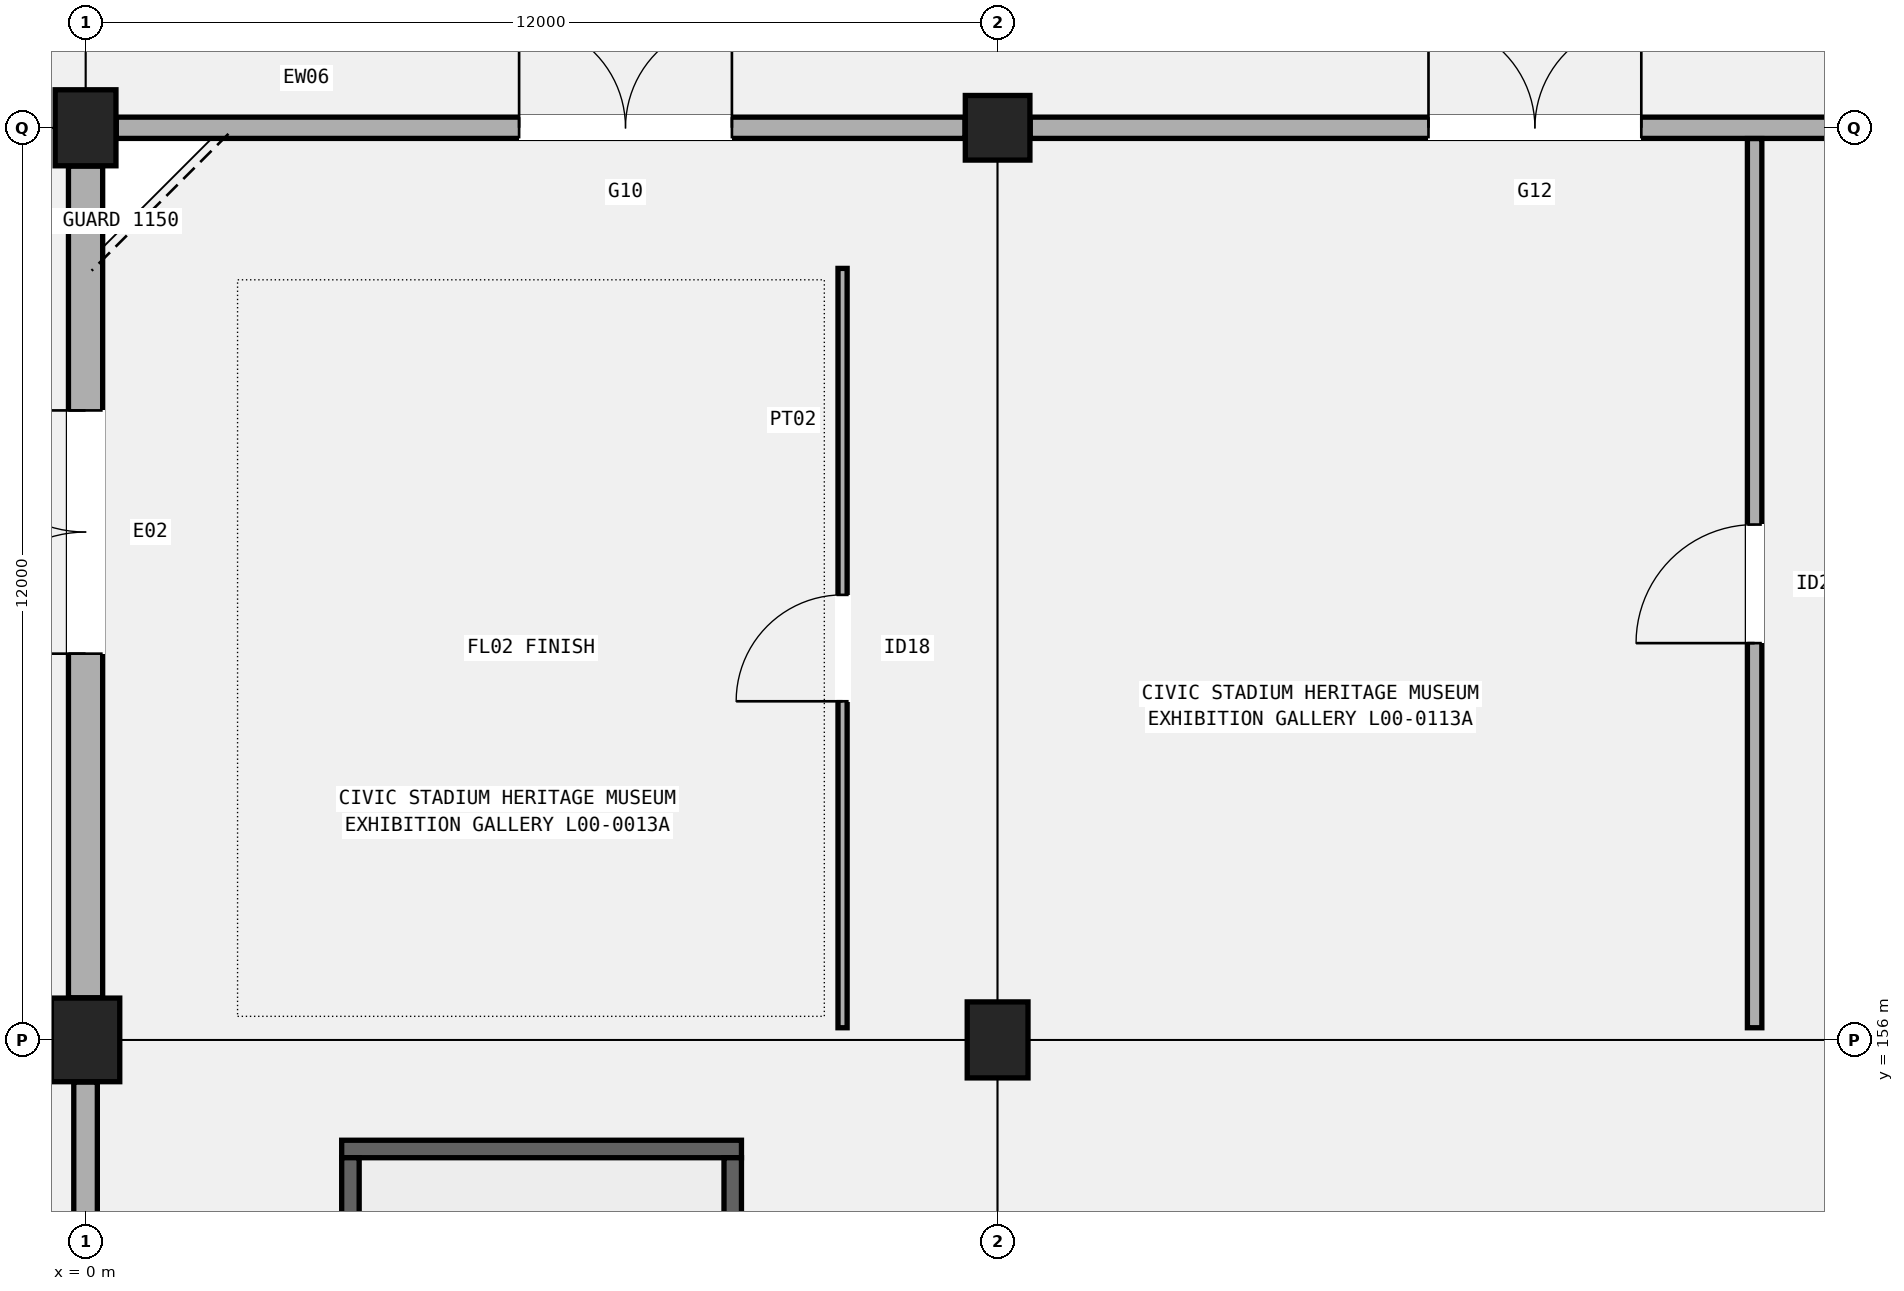
"""IFC4 building model, lengths in metres.
Left out: names, types, materials, properties, quantities, classifications, styles, units other than length and angle.
Written with IfcOpenShell. Run it as: python <this file> out.ifc"""

import sys

from ifc_helpers import new_model, si_unit, direction, frame, frame_2d, origin, origin_2d, place, context, subcontext, project, spatial, rectangle, circle, extrude, element, fill, save


model = new_model("IFC4")
c1 = context("Model", 3, precision=1e-05, world=origin(), true_north=direction((0.0, 1.0)))
c2 = subcontext(c1, "Body", "Model", "MODEL_VIEW")
j1 = project(units=[si_unit("LENGTHUNIT", "METRE"), si_unit("PLANEANGLEUNIT", "RADIAN")], contexts=[c1])
p1 = place(None, origin())
s1 = spatial("IfcSite", under=j1, at=p1, CompositionType="ELEMENT")
p2 = place(p1, origin())
s2 = spatial("IfcBuilding", under=s1, at=p2, CompositionType="ELEMENT")
p3 = place(p2, origin())
s3 = spatial("IfcBuildingStorey", under=s2, at=p3, CompositionType="ELEMENT", Elevation=0.0)
p4 = place(p3, frame((0.0, 156.0, 0.0), z_axis=(0.0, 0.0, 1.0), x_axis=(1.0, 0.0, 0.0)))
e1 = element("IfcColumn", 1, at=p4, inside=s3, PredefinedType="COLUMN", context=c2, shape_type="SweptSolid", body=[
    extrude(rectangle(XDim=0.9, YDim=1.1, at=origin_2d()), origin(), (0.0, 0.0, 1.0), 5.4),
])
for number, where, z_axis, x_axis in (
    (2, (0.0, 168.0, 0.0), (0.0, 0.0, 1.0), (1.0, 0.0, 0.0)),
    (3, (12.0, 156.0, 0.0), (0.0, 0.0, 1.0), (1.0, 0.0, 0.0)),
):
    element("IfcColumn", number, at=place(p3, frame(where, z_axis=z_axis, x_axis=x_axis)), inside=s3, PredefinedType="COLUMN", context=c2, shape_type="SweptSolid", body=[
        extrude(rectangle(XDim=0.8, YDim=1.0, at=origin_2d()), origin(), (0.0, 0.0, 1.0), 5.4),
    ])
p5 = place(p3, frame((12.0, 168.0, 0.0), z_axis=(0.0, 0.0, 1.0), x_axis=(1.0, 0.0, 0.0)))
e4 = element("IfcColumn", 4, at=p5, inside=s3, PredefinedType="COLUMN", context=c2, shape_type="SweptSolid", body=[
    extrude(circle(Radius=0.425, at=origin_2d()), origin(), (0.0, 0.0, 1.0), 5.4),
])
p6 = place(p3, frame((0.0, 144.604, 0.0), z_axis=(0.0, 0.0, 1.0), x_axis=(0.0, 1.0, 0.0)))
e5 = element("IfcWall", 5, at=p6, inside=s3, PredefinedType="SOLIDWALL", context=c2, shape_type="SweptSolid", body=[
    extrude(rectangle(XDim=10.842, YDim=0.31, at=frame_2d((5.421, 0.0))), origin(), (0.0, 0.0, 1.0), 4.24),
])
p7 = place(p6, frame((5.105, 0.0, 0.0)))
e6 = element("IfcOpeningElement", 6, at=p7, cuts=e5, PredefinedType="OPENING", context=c2, shape_type="SweptSolid", body=[
    extrude(rectangle(XDim=2.8, YDim=2.4, at=frame_2d((1.4, 1.2))), frame((0.0, 0.165, 0.0), z_axis=(0.0, -1.0, 0.0), x_axis=(1.0, 0.0, 0.0)), (0.0, 0.0, 1.0), 0.33),
])
p8 = place(p3, frame((0.404, 168.0, 0.0), z_axis=(0.0, 0.0, 1.0), x_axis=(1.0, 0.0, 0.0)))
e7 = element("IfcWall", 7, at=p8, inside=s3, PredefinedType="SOLIDWALL", context=c2, shape_type="SweptSolid", body=[
    extrude(rectangle(XDim=11.167, YDim=0.28, at=frame_2d((5.583, 0.0))), origin(), (0.0, 0.0, 1.0), 4.24),
])
p9 = place(p8, frame((5.3, 0.0, 0.0)))
e8 = element("IfcOpeningElement", 8, at=p9, cuts=e7, PredefinedType="OPENING", context=c2, shape_type="SweptSolid", body=[
    extrude(rectangle(XDim=2.8, YDim=2.4, at=frame_2d((1.4, 1.2))), frame((0.0, 0.15, 0.0), z_axis=(0.0, -1.0, 0.0), x_axis=(1.0, 0.0, 0.0)), (0.0, 0.0, 1.0), 0.3),
])
p10 = place(p3, frame((0.0, 156.554, 0.0), z_axis=(0.0, 0.0, 1.0), x_axis=(0.0, 1.0, 0.0)))
e9 = element("IfcWall", 9, at=p10, inside=s3, PredefinedType="SOLIDWALL", context=c2, shape_type="SweptSolid", body=[
    extrude(rectangle(XDim=10.942, YDim=0.45, at=frame_2d((5.471, 0.0))), origin(), (0.0, 0.0, 1.0), 4.34),
])
p11 = place(p10, frame((4.528, 0.0, 0.0)))
e10 = element("IfcOpeningElement", 10, at=p11, cuts=e9, PredefinedType="OPENING", context=c2, shape_type="SweptSolid", body=[
    extrude(rectangle(XDim=3.2, YDim=2.6, at=frame_2d((1.6, 1.3))), frame((0.0, 0.235, 0.0), z_axis=(0.0, -1.0, 0.0), x_axis=(1.0, 0.0, 0.0)), (0.0, 0.0, 1.0), 0.47),
])
p12 = place(p3, frame((12.429, 168.0, 0.0), z_axis=(0.0, 0.0, 1.0), x_axis=(1.0, 0.0, 0.0)))
e11 = element("IfcWall", 11, at=p12, inside=s3, PredefinedType="SOLIDWALL", context=c2, shape_type="SweptSolid", body=[
    extrude(rectangle(XDim=11.067, YDim=0.28, at=frame_2d((5.534, 0.0))), origin(), (0.0, 0.0, 1.0), 4.34),
])
p13 = place(p12, frame((5.24, 0.0, 0.0)))
e12 = element("IfcOpeningElement", 12, at=p13, cuts=e11, PredefinedType="OPENING", context=c2, shape_type="SweptSolid", body=[
    extrude(rectangle(XDim=2.8, YDim=2.4, at=frame_2d((1.4, 1.2))), frame((0.0, 0.15, 0.0), z_axis=(0.0, -1.0, 0.0), x_axis=(1.0, 0.0, 0.0)), (0.0, 0.0, 1.0), 0.3),
])
p14 = place(p3, frame((3.37, 154.565, 0.0), z_axis=(0.0, 0.0, 1.0), x_axis=(1.0, 0.0, 0.0)))
e13 = element("IfcWall", 13, at=p14, inside=s3, PredefinedType="SHEAR", context=c2, shape_type="SweptSolid", body=[
    extrude(rectangle(XDim=5.26, YDim=0.23, at=frame_2d((2.63, 0.0))), origin(), (0.0, 0.0, 1.0), 5.14),
])
for number, where, z_axis, x_axis in (
    (14, (3.485, 145.55, 0.0), (0.0, 0.0, 1.0), (0.0, 1.0, 0.0)),
    (15, (8.515, 145.55, 0.0), (0.0, 0.0, 1.0), (0.0, 1.0, 0.0)),
):
    element("IfcWall", number, at=place(p3, frame(where, z_axis=z_axis, x_axis=x_axis)), inside=s3, PredefinedType="SHEAR", context=c2, shape_type="SweptSolid", body=[
        extrude(rectangle(XDim=8.9, YDim=0.23, at=frame_2d((4.45, 0.0))), origin(), (0.0, 0.0, 1.0), 5.14),
    ])
p15 = place(p3, frame((9.96, 156.16, 0.0), z_axis=(0.0, 0.0, 1.0), x_axis=(0.0, 1.0, 0.0)))
e16 = element("IfcWall", 16, at=p15, inside=s3, PredefinedType="PARTITIONING", context=c2, shape_type="SweptSolid", body=[
    extrude(rectangle(XDim=9.99, YDim=0.12, at=frame_2d((4.995, 0.0))), origin(), (0.0, 0.0, 1.0), 4.52),
])
p16 = place(p15, frame((4.295, 0.0, 0.0)))
e17 = element("IfcOpeningElement", 17, at=p16, cuts=e16, PredefinedType="OPENING", context=c2, shape_type="SweptSolid", body=[
    extrude(rectangle(XDim=1.4, YDim=2.24, at=frame_2d((0.7, 1.12))), frame((0.0, 0.07, 0.0), z_axis=(0.0, -1.0, 0.0), x_axis=(1.0, 0.0, 0.0)), (0.0, 0.0, 1.0), 0.14),
])
p17 = place(p3, frame((21.96, 156.16, 0.0), z_axis=(0.0, 0.0, 1.0), x_axis=(0.0, 1.0, 0.0)))
e18 = element("IfcWall", 18, at=p17, inside=s3, PredefinedType="PARTITIONING", context=c2, shape_type="SweptSolid", body=[
    extrude(rectangle(XDim=11.698, YDim=0.19, at=frame_2d((5.849, 0.0))), origin(), (0.0, 0.0, 1.0), 4.52),
])
p18 = place(p17, frame((5.06, 0.0, 0.0)))
e19 = element("IfcOpeningElement", 19, at=p18, cuts=e18, PredefinedType="OPENING", context=c2, shape_type="SweptSolid", body=[
    extrude(rectangle(XDim=1.56, YDim=2.26, at=frame_2d((0.78, 1.13))), frame((0.0, 0.105, 0.0), z_axis=(0.0, -1.0, 0.0), x_axis=(1.0, 0.0, 0.0)), (0.0, 0.0, 1.0), 0.21),
])
p19 = place(p9, origin())
e20 = element("IfcDoor", 20, at=p19, inside=s3, OperationType="DOUBLE_DOOR_SINGLE_SWING", PredefinedType="DOOR", context=c2, shape_type="SweptSolid", body=[
    extrude(rectangle(XDim=2.8, YDim=2.4, at=frame_2d((1.4, 1.2))), frame((0.0, 0.025, 0.0), z_axis=(0.0, -1.0, 0.0), x_axis=(1.0, 0.0, 0.0)), (0.0, 0.0, 1.0), 0.05),
])
fill(e8, e20)
p20 = place(p11, origin())
e21 = element("IfcDoor", 21, at=p20, inside=s3, OperationType="DOUBLE_DOOR_SINGLE_SWING", PredefinedType="DOOR", context=c2, shape_type="SweptSolid", body=[
    extrude(rectangle(XDim=3.2, YDim=2.6, at=frame_2d((1.6, 1.3))), frame((0.0, 0.025, 0.0), z_axis=(0.0, -1.0, 0.0), x_axis=(1.0, 0.0, 0.0)), (0.0, 0.0, 1.0), 0.05),
])
fill(e10, e21)
p21 = place(p13, origin())
e22 = element("IfcDoor", 22, at=p21, inside=s3, OperationType="DOUBLE_DOOR_SINGLE_SWING", PredefinedType="DOOR", context=c2, shape_type="SweptSolid", body=[
    extrude(rectangle(XDim=2.8, YDim=2.4, at=frame_2d((1.4, 1.2))), frame((0.0, 0.025, 0.0), z_axis=(0.0, -1.0, 0.0), x_axis=(1.0, 0.0, 0.0)), (0.0, 0.0, 1.0), 0.05),
])
fill(e12, e22)
p22 = place(p16, origin())
e23 = element("IfcDoor", 23, at=p22, inside=s3, OperationType="SINGLE_SWING_LEFT", PredefinedType="DOOR", context=c2, shape_type="SweptSolid", body=[
    extrude(rectangle(XDim=1.4, YDim=2.24, at=frame_2d((0.7, 1.12))), frame((0.0, 0.025, 0.0), z_axis=(0.0, -1.0, 0.0), x_axis=(1.0, 0.0, 0.0)), (0.0, 0.0, 1.0), 0.05),
])
fill(e17, e23)
p23 = place(p18, origin())
e24 = element("IfcDoor", 24, at=p23, inside=s3, OperationType="SINGLE_SWING_LEFT", PredefinedType="DOOR", context=c2, shape_type="SweptSolid", body=[
    extrude(rectangle(XDim=1.56, YDim=2.26, at=frame_2d((0.78, 1.13))), frame((0.0, 0.025, 0.0), z_axis=(0.0, -1.0, 0.0), x_axis=(1.0, 0.0, 0.0)), (0.0, 0.0, 1.0), 0.05),
])
fill(e19, e24)
save(model, sys.argv[1])
